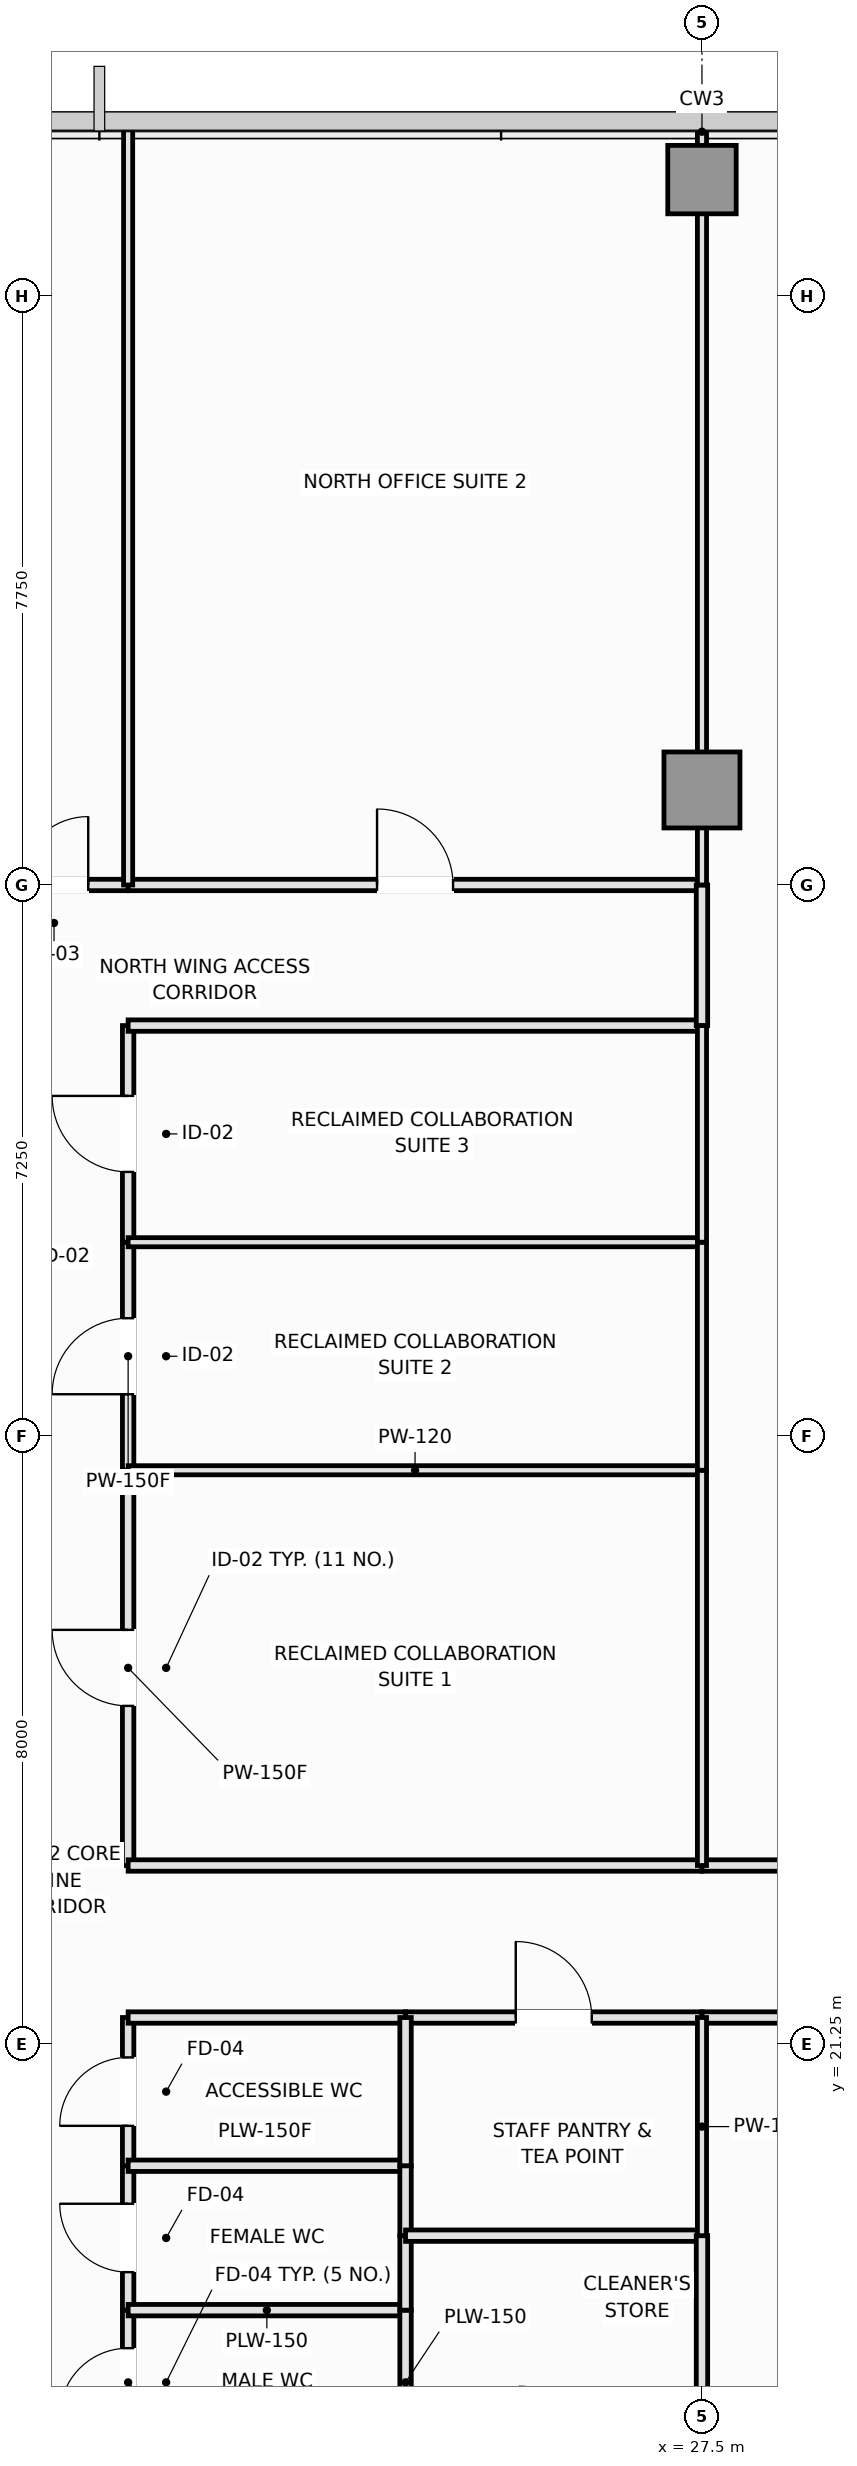
"""IFC4 building model, lengths in metres.
Left out: names, types, materials, properties, quantities, classifications, styles, units other than length and angle.
Written with IfcOpenShell. Run it as: python <this file> out.ifc"""

import sys

from ifc_helpers import new_model, si_unit, direction, frame, frame_2d, origin, origin_2d, place, context, subcontext, project, spatial, rectangle, extrude, element, fill, save


model = new_model("IFC4")
c1 = context("Model", 3, precision=1e-05, world=origin(), true_north=direction((0.0, 1.0)))
c2 = subcontext(c1, "Body", "Model", "MODEL_VIEW")
j1 = project(units=[si_unit("LENGTHUNIT", "METRE"), si_unit("PLANEANGLEUNIT", "RADIAN")], contexts=[c1])
p1 = place(None, origin())
s1 = spatial("IfcSite", under=j1, at=p1, CompositionType="ELEMENT")
p2 = place(p1, origin())
s2 = spatial("IfcBuilding", under=s1, at=p2, CompositionType="ELEMENT")
p3 = place(p2, frame((0.0, 0.0, 166.15)))
s3 = spatial("IfcBuildingStorey", under=s2, at=p3, CompositionType="ELEMENT", Elevation=166.15)
p4 = place(p3, frame((27.5, 37.75, 0.0), z_axis=(0.0, 0.0, 1.0), x_axis=(1.0, 0.0, 0.0)))
e1 = element("IfcColumn", 1, at=p4, inside=s3, PredefinedType="COLUMN", context=c2, shape_type="SweptSolid", body=[
    extrude(rectangle(XDim=1.0, YDim=1.0, at=origin_2d()), origin(), (0.0, 0.0, 1.0), 3.55),
])
p5 = place(p3, frame((27.5, 45.78, 0.0), z_axis=(0.0, 0.0, 1.0), x_axis=(1.0, 0.0, 0.0)))
e2 = element("IfcColumn", 2, at=p5, inside=s3, PredefinedType="COLUMN", context=c2, shape_type="SweptSolid", body=[
    extrude(rectangle(XDim=0.9, YDim=0.9, at=origin_2d()), origin(), (0.0, 0.0, 1.0), 3.55),
])
p6 = place(p3, frame((19.95, 15.85, 0.0), z_axis=(0.0, 0.0, 1.0), x_axis=(0.0, 1.0, 0.0)))
e3 = element("IfcWall", 3, at=p6, inside=s3, PredefinedType="PLUMBINGWALL", context=c2, shape_type="SweptSolid", body=[
    extrude(rectangle(XDim=1.9, YDim=0.15, at=frame_2d((0.95, 0.0))), origin(), (0.0, 0.0, 1.0), 3.37),
])
p7 = place(p6, frame((0.5, 0.0, 0.0)))
e4 = element("IfcOpeningElement", 4, at=p7, cuts=e3, PredefinedType="OPENING", context=c2, shape_type="SweptSolid", body=[
    extrude(rectangle(XDim=0.9, YDim=2.1, at=frame_2d((0.45, 1.05))), frame((0.0, 0.085, 0.0), z_axis=(0.0, -1.0, 0.0), x_axis=(1.0, 0.0, 0.0)), (0.0, 0.0, 1.0), 0.17),
])
p8 = place(p3, frame((19.95, 17.75, 0.0), z_axis=(0.0, 0.0, 1.0), x_axis=(0.0, 1.0, 0.0)))
e5 = element("IfcWall", 5, at=p8, inside=s3, PredefinedType="PLUMBINGWALL", context=c2, shape_type="SweptSolid", body=[
    extrude(rectangle(XDim=1.9, YDim=0.15, at=frame_2d((0.95, 0.0))), origin(), (0.0, 0.0, 1.0), 3.37),
])
p9 = place(p8, frame((0.5, 0.0, 0.0)))
e6 = element("IfcOpeningElement", 6, at=p9, cuts=e5, PredefinedType="OPENING", context=c2, shape_type="SweptSolid", body=[
    extrude(rectangle(XDim=0.9, YDim=2.1, at=frame_2d((0.45, 1.05))), frame((0.0, 0.085, 0.0), z_axis=(0.0, -1.0, 0.0), x_axis=(1.0, 0.0, 0.0)), (0.0, 0.0, 1.0), 0.17),
])
p10 = place(p3, frame((19.95, 19.65, 0.0), z_axis=(0.0, 0.0, 1.0), x_axis=(0.0, 1.0, 0.0)))
e7 = element("IfcWall", 7, at=p10, inside=s3, PredefinedType="PLUMBINGWALL", context=c2, shape_type="SweptSolid", body=[
    extrude(rectangle(XDim=1.95, YDim=0.15, at=frame_2d((0.975, 0.0))), origin(), (0.0, 0.0, 1.0), 3.37),
])
p11 = place(p10, frame((0.525, 0.0, 0.0)))
e8 = element("IfcOpeningElement", 8, at=p11, cuts=e7, PredefinedType="OPENING", context=c2, shape_type="SweptSolid", body=[
    extrude(rectangle(XDim=0.9, YDim=2.1, at=frame_2d((0.45, 1.05))), frame((0.0, 0.085, 0.0), z_axis=(0.0, -1.0, 0.0), x_axis=(1.0, 0.0, 0.0)), (0.0, 0.0, 1.0), 0.17),
])
p12 = place(p3, frame((19.95, 23.6, 0.0), z_axis=(0.0, 0.0, 1.0), x_axis=(0.0, 1.0, 0.0)))
e9 = element("IfcWall", 9, at=p12, inside=s3, PredefinedType="PARTITIONING", context=c2, shape_type="SweptSolid", body=[
    extrude(rectangle(XDim=5.2, YDim=0.15, at=frame_2d((2.6, 0.0))), origin(), (0.0, 0.0, 1.0), 3.37),
])
p13 = place(p12, frame((2.1, 0.0, 0.0)))
e10 = element("IfcOpeningElement", 10, at=p13, cuts=e9, PredefinedType="OPENING", context=c2, shape_type="SweptSolid", body=[
    extrude(rectangle(XDim=1.0, YDim=2.15, at=frame_2d((0.5, 1.075))), frame((0.0, 0.085, 0.0), z_axis=(0.0, -1.0, 0.0), x_axis=(1.0, 0.0, 0.0)), (0.0, 0.0, 1.0), 0.17),
])
p14 = place(p3, frame((19.95, 28.8, 0.0), z_axis=(0.0, 0.0, 1.0), x_axis=(0.0, 1.0, 0.0)))
e11 = element("IfcWall", 11, at=p14, inside=s3, PredefinedType="PARTITIONING", context=c2, shape_type="SweptSolid", body=[
    extrude(rectangle(XDim=3.0, YDim=0.15, at=frame_2d((1.5, 0.0))), origin(), (0.0, 0.0, 1.0), 3.37),
])
p15 = place(p14, frame((1.0, 0.0, 0.0)))
e12 = element("IfcOpeningElement", 12, at=p15, cuts=e11, PredefinedType="OPENING", context=c2, shape_type="SweptSolid", body=[
    extrude(rectangle(XDim=1.0, YDim=2.15, at=frame_2d((0.5, 1.075))), frame((0.0, 0.085, 0.0), z_axis=(0.0, -1.0, 0.0), x_axis=(1.0, 0.0, 0.0)), (0.0, 0.0, 1.0), 0.17),
])
p16 = place(p3, frame((19.95, 31.8, 0.0), z_axis=(0.0, 0.0, 1.0), x_axis=(0.0, 1.0, 0.0)))
e13 = element("IfcWall", 13, at=p16, inside=s3, PredefinedType="PARTITIONING", context=c2, shape_type="SweptSolid", body=[
    extrude(rectangle(XDim=2.85, YDim=0.15, at=frame_2d((1.425, 0.0))), origin(), (0.0, 0.0, 1.0), 3.37),
])
p17 = place(p16, frame((0.925, 0.0, 0.0)))
e14 = element("IfcOpeningElement", 14, at=p17, cuts=e13, PredefinedType="OPENING", context=c2, shape_type="SweptSolid", body=[
    extrude(rectangle(XDim=1.0, YDim=2.15, at=frame_2d((0.5, 1.075))), frame((0.0, 0.085, 0.0), z_axis=(0.0, -1.0, 0.0), x_axis=(1.0, 0.0, 0.0)), (0.0, 0.0, 1.0), 0.17),
])
p18 = place(p3, frame((18.0, 36.5, 0.0), z_axis=(0.0, 0.0, 1.0), x_axis=(1.0, 0.0, 0.0)))
e15 = element("IfcWall", 15, at=p18, inside=s3, PredefinedType="PARTITIONING", context=c2, shape_type="SweptSolid", body=[
    extrude(rectangle(XDim=1.95, YDim=0.15, at=frame_2d((0.975, 0.0))), origin(), (0.0, 0.0, 1.0), 3.37),
])
p19 = place(p18, frame((0.525, 0.0, 0.0)))
e16 = element("IfcOpeningElement", 16, at=p19, cuts=e15, PredefinedType="OPENING", context=c2, shape_type="SweptSolid", body=[
    extrude(rectangle(XDim=0.9, YDim=2.1, at=frame_2d((0.45, 1.05))), frame((0.0, 0.085, 0.0), z_axis=(0.0, -1.0, 0.0), x_axis=(1.0, 0.0, 0.0)), (0.0, 0.0, 1.0), 0.17),
])
p20 = place(p3, frame((19.95, 21.6, 0.0), z_axis=(0.0, 0.0, 1.0), x_axis=(1.0, 0.0, 0.0)))
e17 = element("IfcWall", 17, at=p20, inside=s3, PredefinedType="PLUMBINGWALL", context=c2, shape_type="SweptSolid", body=[
    extrude(rectangle(XDim=3.65, YDim=0.15, at=frame_2d((1.825, 0.0))), origin(), (0.0, 0.0, 1.0), 3.37),
])
p21 = place(p3, frame((23.6, 21.6, 0.0), z_axis=(0.0, 0.0, 1.0), x_axis=(1.0, 0.0, 0.0)))
e18 = element("IfcWall", 18, at=p21, inside=s3, PredefinedType="PARTITIONING", context=c2, shape_type="SweptSolid", body=[
    extrude(rectangle(XDim=3.9, YDim=0.15, at=frame_2d((1.95, 0.0))), origin(), (0.0, 0.0, 1.0), 3.37),
])
p22 = place(p21, frame((1.45, 0.0, 0.0)))
e19 = element("IfcOpeningElement", 19, at=p22, cuts=e18, PredefinedType="OPENING", context=c2, shape_type="SweptSolid", body=[
    extrude(rectangle(XDim=1.0, YDim=2.15, at=frame_2d((0.5, 1.075))), frame((0.0, 0.085, 0.0), z_axis=(0.0, -1.0, 0.0), x_axis=(1.0, 0.0, 0.0)), (0.0, 0.0, 1.0), 0.17),
])
p23 = place(p3, frame((19.95, 23.6, 0.0), z_axis=(0.0, 0.0, 1.0), x_axis=(1.0, 0.0, 0.0)))
e20 = element("IfcWall", 20, at=p23, inside=s3, PredefinedType="PARTITIONING", context=c2, shape_type="SweptSolid", body=[
    extrude(rectangle(XDim=7.55, YDim=0.15, at=frame_2d((3.775, 0.0))), origin(), (0.0, 0.0, 1.0), 3.37),
])
p24 = place(p3, frame((27.5, 21.6, 0.0), z_axis=(0.0, 0.0, 1.0), x_axis=(1.0, 0.0, 0.0)))
e21 = element("IfcWall", 21, at=p24, inside=s3, PredefinedType="PARTITIONING", context=c2, shape_type="SweptSolid", body=[
    extrude(rectangle(XDim=10.7, YDim=0.15, at=frame_2d((5.35, 0.0))), origin(), (0.0, 0.0, 1.0), 3.37),
])
p25 = place(p24, frame((4.85, 0.0, 0.0)))
e22 = element("IfcOpeningElement", 22, at=p25, cuts=e21, PredefinedType="OPENING", context=c2, shape_type="SweptSolid", body=[
    extrude(rectangle(XDim=1.0, YDim=2.15, at=frame_2d((0.5, 1.075))), frame((0.0, 0.085, 0.0), z_axis=(0.0, -1.0, 0.0), x_axis=(1.0, 0.0, 0.0)), (0.0, 0.0, 1.0), 0.17),
])
p26 = place(p3, frame((27.5, 23.6, 0.0), z_axis=(0.0, 0.0, 1.0), x_axis=(1.0, 0.0, 0.0)))
e23 = element("IfcWall", 23, at=p26, inside=s3, PredefinedType="PARTITIONING", context=c2, shape_type="SweptSolid", body=[
    extrude(rectangle(XDim=5.3, YDim=0.15, at=frame_2d((2.65, 0.0))), origin(), (0.0, 0.0, 1.0), 3.37),
])
p27 = place(p26, frame((2.15, 0.0, 0.0)))
e24 = element("IfcOpeningElement", 24, at=p27, cuts=e23, PredefinedType="OPENING", context=c2, shape_type="SweptSolid", body=[
    extrude(rectangle(XDim=1.0, YDim=2.15, at=frame_2d((0.5, 1.075))), frame((0.0, 0.085, 0.0), z_axis=(0.0, -1.0, 0.0), x_axis=(1.0, 0.0, 0.0)), (0.0, 0.0, 1.0), 0.17),
])
p28 = place(p3, frame((19.95, 34.65, 0.0), z_axis=(0.0, 0.0, 1.0), x_axis=(1.0, 0.0, 0.0)))
e25 = element("IfcWall", 25, at=p28, inside=s3, PredefinedType="PARTITIONING", context=c2, shape_type="SweptSolid", body=[
    extrude(rectangle(XDim=7.55, YDim=0.15, at=frame_2d((3.775, 0.0))), origin(), (0.0, 0.0, 1.0), 3.37),
])
p29 = place(p3, frame((19.95, 36.5, 0.0), z_axis=(0.0, 0.0, 1.0), x_axis=(1.0, 0.0, 0.0)))
e26 = element("IfcWall", 26, at=p29, inside=s3, PredefinedType="PARTITIONING", context=c2, shape_type="SweptSolid", body=[
    extrude(rectangle(XDim=7.55, YDim=0.15, at=frame_2d((3.775, 0.0))), origin(), (0.0, 0.0, 1.0), 3.37),
])
p30 = place(p29, frame((3.275, 0.0, 0.0)))
e27 = element("IfcOpeningElement", 27, at=p30, cuts=e26, PredefinedType="OPENING", context=c2, shape_type="SweptSolid", body=[
    extrude(rectangle(XDim=1.0, YDim=2.15, at=frame_2d((0.5, 1.075))), frame((0.0, 0.085, 0.0), z_axis=(0.0, -1.0, 0.0), x_axis=(1.0, 0.0, 0.0)), (0.0, 0.0, 1.0), 0.17),
])
p31 = place(p3, frame((27.5, 34.65, 0.0), z_axis=(0.0, 0.0, 1.0), x_axis=(0.0, 1.0, 0.0)))
e28 = element("IfcWall", 28, at=p31, inside=s3, PredefinedType="PARTITIONING", context=c2, shape_type="SweptSolid", body=[
    extrude(rectangle(XDim=1.85, YDim=0.15, at=frame_2d((0.925, 0.0))), origin(), (0.0, 0.0, 1.0), 3.37),
])
p32 = place(p3, frame((19.95, 17.75, 0.0), z_axis=(0.0, 0.0, 1.0), x_axis=(1.0, 0.0, 0.0)))
e29 = element("IfcWall", 29, at=p32, inside=s3, PredefinedType="PLUMBINGWALL", context=c2, shape_type="SweptSolid", body=[
    extrude(rectangle(XDim=3.65, YDim=0.15, at=frame_2d((1.825, 0.0))), origin(), (0.0, 0.0, 1.0), 3.37),
])
p33 = place(p3, frame((23.6, 15.85, 0.0), z_axis=(0.0, 0.0, 1.0), x_axis=(0.0, 1.0, 0.0)))
e30 = element("IfcWall", 30, at=p33, inside=s3, PredefinedType="PLUMBINGWALL", context=c2, shape_type="SweptSolid", body=[
    extrude(rectangle(XDim=1.9, YDim=0.15, at=frame_2d((0.95, 0.0))), origin(), (0.0, 0.0, 1.0), 3.37),
])
p34 = place(p3, frame((19.95, 19.65, 0.0), z_axis=(0.0, 0.0, 1.0), x_axis=(1.0, 0.0, 0.0)))
e31 = element("IfcWall", 31, at=p34, inside=s3, PredefinedType="PLUMBINGWALL", context=c2, shape_type="SweptSolid", body=[
    extrude(rectangle(XDim=3.65, YDim=0.15, at=frame_2d((1.825, 0.0))), origin(), (0.0, 0.0, 1.0), 3.37),
])
p35 = place(p3, frame((23.6, 17.75, 0.0), z_axis=(0.0, 0.0, 1.0), x_axis=(0.0, 1.0, 0.0)))
e32 = element("IfcWall", 32, at=p35, inside=s3, PredefinedType="PLUMBINGWALL", context=c2, shape_type="SweptSolid", body=[
    extrude(rectangle(XDim=0.98, YDim=0.15, at=frame_2d((0.49, 0.0))), origin(), (0.0, 0.0, 1.0), 3.37),
])
p36 = place(p3, frame((23.6, 18.73, 0.0), z_axis=(0.0, 0.0, 1.0), x_axis=(0.0, 1.0, 0.0)))
e33 = element("IfcWall", 33, at=p36, inside=s3, PredefinedType="PLUMBINGWALL", context=c2, shape_type="SweptSolid", body=[
    extrude(rectangle(XDim=0.92, YDim=0.15, at=frame_2d((0.46, 0.0))), origin(), (0.0, 0.0, 1.0), 3.37),
])
p37 = place(p3, frame((23.6, 19.65, 0.0), z_axis=(0.0, 0.0, 1.0), x_axis=(0.0, 1.0, 0.0)))
e34 = element("IfcWall", 34, at=p37, inside=s3, PredefinedType="PLUMBINGWALL", context=c2, shape_type="SweptSolid", body=[
    extrude(rectangle(XDim=1.95, YDim=0.15, at=frame_2d((0.975, 0.0))), origin(), (0.0, 0.0, 1.0), 3.37),
])
p38 = place(p3, frame((23.6, 18.73, 0.0), z_axis=(0.0, 0.0, 1.0), x_axis=(1.0, 0.0, 0.0)))
e35 = element("IfcWall", 35, at=p38, inside=s3, PredefinedType="PLUMBINGWALL", context=c2, shape_type="SweptSolid", body=[
    extrude(rectangle(XDim=3.9, YDim=0.15, at=frame_2d((1.95, 0.0))), origin(), (0.0, 0.0, 1.0), 3.37),
])
p39 = place(p3, frame((27.5, 15.85, 0.0), z_axis=(0.0, 0.0, 1.0), x_axis=(0.0, 1.0, 0.0)))
e36 = element("IfcWall", 36, at=p39, inside=s3, PredefinedType="PLUMBINGWALL", context=c2, shape_type="SweptSolid", body=[
    extrude(rectangle(XDim=2.88, YDim=0.15, at=frame_2d((1.44, 0.0))), origin(), (0.0, 0.0, 1.0), 3.37),
])
p40 = place(p3, frame((27.5, 18.73, 0.0), z_axis=(0.0, 0.0, 1.0), x_axis=(0.0, 1.0, 0.0)))
e37 = element("IfcWall", 37, at=p40, inside=s3, PredefinedType="PARTITIONING", context=c2, shape_type="SweptSolid", body=[
    extrude(rectangle(XDim=2.87, YDim=0.12, at=frame_2d((1.435, 0.0))), origin(), (0.0, 0.0, 1.0), 3.37),
])
p41 = place(p3, frame((19.95, 28.8, 0.0), z_axis=(0.0, 0.0, 1.0), x_axis=(1.0, 0.0, 0.0)))
e38 = element("IfcWall", 38, at=p41, inside=s3, PredefinedType="PARTITIONING", context=c2, shape_type="SweptSolid", body=[
    extrude(rectangle(XDim=7.55, YDim=0.12, at=frame_2d((3.775, 0.0))), origin(), (0.0, 0.0, 1.0), 3.37),
])
p42 = place(p3, frame((27.5, 23.6, 0.0), z_axis=(0.0, 0.0, 1.0), x_axis=(0.0, 1.0, 0.0)))
e39 = element("IfcWall", 39, at=p42, inside=s3, PredefinedType="PARTITIONING", context=c2, shape_type="SweptSolid", body=[
    extrude(rectangle(XDim=5.2, YDim=0.12, at=frame_2d((2.6, 0.0))), origin(), (0.0, 0.0, 1.0), 3.37),
])
p43 = place(p3, frame((19.95, 31.8, 0.0), z_axis=(0.0, 0.0, 1.0), x_axis=(1.0, 0.0, 0.0)))
e40 = element("IfcWall", 40, at=p43, inside=s3, PredefinedType="PARTITIONING", context=c2, shape_type="SweptSolid", body=[
    extrude(rectangle(XDim=7.55, YDim=0.12, at=frame_2d((3.775, 0.0))), origin(), (0.0, 0.0, 1.0), 3.37),
])
p44 = place(p3, frame((27.5, 28.8, 0.0), z_axis=(0.0, 0.0, 1.0), x_axis=(0.0, 1.0, 0.0)))
e41 = element("IfcWall", 41, at=p44, inside=s3, PredefinedType="PARTITIONING", context=c2, shape_type="SweptSolid", body=[
    extrude(rectangle(XDim=3.0, YDim=0.12, at=frame_2d((1.5, 0.0))), origin(), (0.0, 0.0, 1.0), 3.37),
])
p45 = place(p3, frame((27.5, 31.8, 0.0), z_axis=(0.0, 0.0, 1.0), x_axis=(0.0, 1.0, 0.0)))
e42 = element("IfcWall", 42, at=p45, inside=s3, PredefinedType="PARTITIONING", context=c2, shape_type="SweptSolid", body=[
    extrude(rectangle(XDim=2.85, YDim=0.12, at=frame_2d((1.425, 0.0))), origin(), (0.0, 0.0, 1.0), 3.37),
])
p46 = place(p3, frame((19.95, 36.5, 0.0), z_axis=(0.0, 0.0, 1.0), x_axis=(0.0, 1.0, 0.0)))
e43 = element("IfcWall", 43, at=p46, inside=s3, PredefinedType="PARTITIONING", context=c2, shape_type="SweptSolid", body=[
    extrude(rectangle(XDim=9.99, YDim=0.12, at=frame_2d((4.995, 0.0))), origin(), (0.0, 0.0, 1.0), 3.37),
])
p47 = place(p3, frame((27.5, 36.5, 0.0), z_axis=(0.0, 0.0, 1.0), x_axis=(0.0, 1.0, 0.0)))
e44 = element("IfcWall", 44, at=p47, inside=s3, PredefinedType="PARTITIONING", context=c2, shape_type="SweptSolid", body=[
    extrude(rectangle(XDim=9.99, YDim=0.12, at=frame_2d((4.995, 0.0))), origin(), (0.0, 0.0, 1.0), 2.87),
])
p48 = place(p7, origin())
e45 = element("IfcDoor", 45, at=p48, inside=s3, OperationType="SINGLE_SWING_LEFT", PredefinedType="DOOR", context=c2, shape_type="SweptSolid", body=[
    extrude(rectangle(XDim=0.9, YDim=2.1, at=frame_2d((0.45, 1.05))), frame((0.0, 0.025, 0.0), z_axis=(0.0, -1.0, 0.0), x_axis=(1.0, 0.0, 0.0)), (0.0, 0.0, 1.0), 0.05),
])
fill(e4, e45)
p49 = place(p9, origin())
e46 = element("IfcDoor", 46, at=p49, inside=s3, OperationType="SINGLE_SWING_RIGHT", PredefinedType="DOOR", context=c2, shape_type="SweptSolid", body=[
    extrude(rectangle(XDim=0.9, YDim=2.1, at=frame_2d((0.45, 1.05))), frame((0.0, 0.025, 0.0), z_axis=(0.0, -1.0, 0.0), x_axis=(1.0, 0.0, 0.0)), (0.0, 0.0, 1.0), 0.05),
])
fill(e6, e46)
p50 = place(p11, origin())
e47 = element("IfcDoor", 47, at=p50, inside=s3, OperationType="SINGLE_SWING_LEFT", PredefinedType="DOOR", context=c2, shape_type="SweptSolid", body=[
    extrude(rectangle(XDim=0.9, YDim=2.1, at=frame_2d((0.45, 1.05))), frame((0.0, 0.025, 0.0), z_axis=(0.0, -1.0, 0.0), x_axis=(1.0, 0.0, 0.0)), (0.0, 0.0, 1.0), 0.05),
])
fill(e8, e47)
p51 = place(p13, origin())
e48 = element("IfcDoor", 48, at=p51, inside=s3, OperationType="SINGLE_SWING_RIGHT", PredefinedType="DOOR", context=c2, shape_type="SweptSolid", body=[
    extrude(rectangle(XDim=1.0, YDim=2.15, at=frame_2d((0.5, 1.075))), frame((0.0, 0.025, 0.0), z_axis=(0.0, -1.0, 0.0), x_axis=(1.0, 0.0, 0.0)), (0.0, 0.0, 1.0), 0.05),
])
fill(e10, e48)
p52 = place(p15, origin())
e49 = element("IfcDoor", 49, at=p52, inside=s3, OperationType="SINGLE_SWING_LEFT", PredefinedType="DOOR", context=c2, shape_type="SweptSolid", body=[
    extrude(rectangle(XDim=1.0, YDim=2.15, at=frame_2d((0.5, 1.075))), frame((0.0, 0.025, 0.0), z_axis=(0.0, -1.0, 0.0), x_axis=(1.0, 0.0, 0.0)), (0.0, 0.0, 1.0), 0.05),
])
fill(e12, e49)
p53 = place(p17, origin())
e50 = element("IfcDoor", 50, at=p53, inside=s3, OperationType="SINGLE_SWING_RIGHT", PredefinedType="DOOR", context=c2, shape_type="SweptSolid", body=[
    extrude(rectangle(XDim=1.0, YDim=2.15, at=frame_2d((0.5, 1.075))), frame((0.0, 0.025, 0.0), z_axis=(0.0, -1.0, 0.0), x_axis=(1.0, 0.0, 0.0)), (0.0, 0.0, 1.0), 0.05),
])
fill(e14, e50)
p54 = place(p19, origin())
e51 = element("IfcDoor", 51, at=p54, inside=s3, OperationType="SINGLE_SWING_RIGHT", PredefinedType="DOOR", context=c2, shape_type="SweptSolid", body=[
    extrude(rectangle(XDim=0.9, YDim=2.1, at=frame_2d((0.45, 1.05))), frame((0.0, 0.025, 0.0), z_axis=(0.0, -1.0, 0.0), x_axis=(1.0, 0.0, 0.0)), (0.0, 0.0, 1.0), 0.05),
])
fill(e16, e51)
p55 = place(p22, origin())
e52 = element("IfcDoor", 52, at=p55, inside=s3, OperationType="SINGLE_SWING_LEFT", PredefinedType="DOOR", context=c2, shape_type="SweptSolid", body=[
    extrude(rectangle(XDim=1.0, YDim=2.15, at=frame_2d((0.5, 1.075))), frame((0.0, 0.025, 0.0), z_axis=(0.0, -1.0, 0.0), x_axis=(1.0, 0.0, 0.0)), (0.0, 0.0, 1.0), 0.05),
])
fill(e19, e52)
p56 = place(p30, origin())
e53 = element("IfcDoor", 53, at=p56, inside=s3, OperationType="SINGLE_SWING_LEFT", PredefinedType="DOOR", context=c2, shape_type="SweptSolid", body=[
    extrude(rectangle(XDim=1.0, YDim=2.15, at=frame_2d((0.5, 1.075))), frame((0.0, 0.025, 0.0), z_axis=(0.0, -1.0, 0.0), x_axis=(1.0, 0.0, 0.0)), (0.0, 0.0, 1.0), 0.05),
])
fill(e27, e53)
save(model, sys.argv[1])
